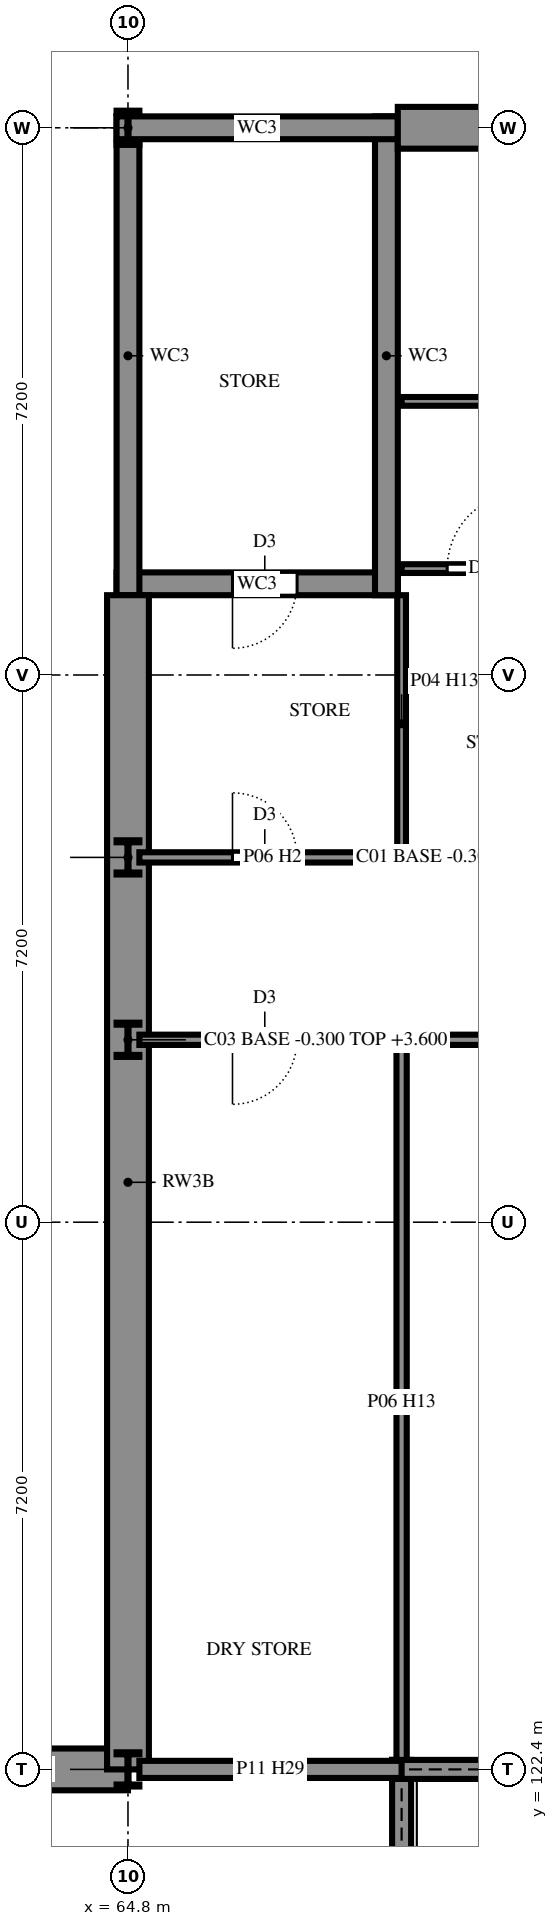
"""IFC4 building model, lengths in metres.
Left out: names, types, materials, properties, quantities, classifications, styles, units other than length and angle.
Written with IfcOpenShell. Run it as: python <this file> out.ifc"""

import sys

from ifc_helpers import new_model, si_unit, direction, frame, frame_2d, origin, origin_2d, place, context, subcontext, project, spatial, rectangle, i_section, extrude, element, fill, save


model = new_model("IFC4")
c1 = context("Model", 3, precision=1e-05, world=origin(), true_north=direction((0.0, 1.0)))
c2 = subcontext(c1, "Body", "Model", "MODEL_VIEW")
j1 = project(units=[si_unit("LENGTHUNIT", "METRE"), si_unit("PLANEANGLEUNIT", "RADIAN")], contexts=[c1])
p1 = place(None, origin())
s1 = spatial("IfcSite", under=j1, at=p1, CompositionType="ELEMENT")
p2 = place(p1, origin())
s2 = spatial("IfcBuilding", under=s1, at=p2, CompositionType="ELEMENT")
p3 = place(p2, origin())
s3 = spatial("IfcBuildingStorey", under=s2, at=p3, CompositionType="ELEMENT", Elevation=0.0)
for number, where, z_axis, x_axis in (
    (1, (64.8, 122.4, -0.3), (0.0, 0.0, 1.0), (1.0, 0.0, 0.0)),
    (2, (64.8, 132.0, -0.3), (0.0, 0.0, 1.0), (1.0, 0.0, 0.0)),
    (3, (64.8, 134.4, -0.3), (0.0, 0.0, 1.0), (1.0, 0.0, 0.0)),
    (4, (64.8, 144.0, -0.3), (0.0, 0.0, 1.0), (1.0, 0.0, 0.0)),
):
    element("IfcColumn", number, at=place(p3, frame(where, z_axis=z_axis, x_axis=x_axis)), inside=s3, PredefinedType="COLUMN", context=c2, shape_type="SweptSolid", body=[
        extrude(i_section(OverallWidth=0.3, OverallDepth=0.45, WebThickness=0.014, FlangeThickness=0.026, FilletRadius=0.027, at=origin_2d()), origin(), (0.0, 0.0, 1.0), 3.9),
    ])
p4 = place(p3, frame((68.4, 122.525, 0.0), z_axis=(0.0, 0.0, 1.0), x_axis=(0.0, -1.0, 0.0)))
e5 = element("IfcWall", 5, at=p4, inside=s3, PredefinedType="SHEAR", context=c2, shape_type="SweptSolid", body=[
    extrude(rectangle(XDim=6.75, YDim=0.25, at=frame_2d((3.375, 0.0))), origin(), (0.0, 0.0, 1.0), 3.6),
])
p5 = place(p3, frame((73.525, 122.4, 0.0), z_axis=(0.0, 0.0, 1.0), x_axis=(-1.0, 0.0, 0.0)))
e6 = element("IfcWall", 6, at=p5, inside=s3, PredefinedType="SHEAR", context=c2, shape_type="SweptSolid", body=[
    extrude(rectangle(XDim=5.25, YDim=0.25, at=frame_2d((2.625, 0.0))), origin(), (0.0, 0.0, 1.0), 3.6),
])
p6 = place(p3, frame((64.65, 138.0, 0.0), z_axis=(0.0, 0.0, 1.0), x_axis=(1.0, 0.0, 0.0)))
e7 = element("IfcWall", 7, at=p6, inside=s3, PredefinedType="SHEAR", context=c2, shape_type="SweptSolid", body=[
    extrude(rectangle(XDim=3.7, YDim=0.3, at=frame_2d((1.85, 0.0))), origin(), (0.0, 0.0, 1.0), 3.6),
])
p7 = place(p6, frame((1.525, 0.0, 0.0)))
e8 = element("IfcOpeningElement", 8, at=p7, cuts=e7, PredefinedType="OPENING", context=c2, shape_type="SweptSolid", body=[
    extrude(rectangle(XDim=0.85, YDim=2.1, at=frame_2d((0.425, 1.05))), frame((0.0, 0.16, 0.0), z_axis=(0.0, -1.0, 0.0), x_axis=(1.0, 0.0, 0.0)), (0.0, 0.0, 1.0), 0.32),
])
for number, where, z_axis, x_axis in (
    (9, (68.2, 137.85, 0.0), (0.0, 0.0, 1.0), (0.0, 1.0, 0.0)),
    (10, (64.8, 144.15, 0.0), (0.0, 0.0, 1.0), (0.0, -1.0, 0.0)),
):
    element("IfcWall", number, at=place(p3, frame(where, z_axis=z_axis, x_axis=x_axis)), inside=s3, PredefinedType="SHEAR", context=c2, shape_type="SweptSolid", body=[
        extrude(rectangle(XDim=6.3, YDim=0.3, at=frame_2d((3.15, 0.0))), origin(), (0.0, 0.0, 1.0), 3.6),
    ])
p8 = place(p3, frame((68.35, 144.0, 0.0), z_axis=(0.0, 0.0, 1.0), x_axis=(-1.0, 0.0, 0.0)))
e11 = element("IfcWall", 11, at=p8, inside=s3, PredefinedType="SHEAR", context=c2, shape_type="SweptSolid", body=[
    extrude(rectangle(XDim=3.7, YDim=0.3, at=frame_2d((1.85, 0.0))), origin(), (0.0, 0.0, 1.0), 3.6),
])
p9 = place(p3, frame((17.325, 122.4, 0.0), z_axis=(0.0, 0.0, 1.0), x_axis=(1.0, 0.0, 0.0)))
e12 = element("IfcWall", 12, at=p9, inside=s3, PredefinedType="SOLIDWALL", context=c2, shape_type="SweptSolid", body=[
    extrude(rectangle(XDim=47.475, YDim=0.55, at=frame_2d((23.738, 0.0))), origin(), (0.0, 0.0, 1.0), 3.6),
])
p10 = place(p3, frame((68.35, 144.0, 0.0), z_axis=(0.0, 0.0, 1.0), x_axis=(1.0, 0.0, 0.0)))
e13 = element("IfcWall", 13, at=p10, inside=s3, PredefinedType="SOLIDWALL", context=c2, shape_type="SweptSolid", body=[
    extrude(rectangle(XDim=25.05, YDim=0.55, at=frame_2d((12.525, 0.0))), origin(), (0.0, 0.0, 1.0), 3.6),
])
p11 = place(p3, frame((64.8, 122.4, 0.0), z_axis=(0.0, 0.0, 1.0), x_axis=(0.0, 1.0, 0.0)))
e14 = element("IfcWall", 14, at=p11, inside=s3, PredefinedType="SOLIDWALL", context=c2, shape_type="SweptSolid", body=[
    extrude(rectangle(XDim=15.45, YDim=0.55, at=frame_2d((7.725, 0.0))), origin(), (0.0, 0.0, 1.0), 3.6),
])
p12 = place(p3, frame((64.95, 122.4, 0.0), z_axis=(0.0, 0.0, 1.0), x_axis=(1.0, 0.0, 0.0)))
e15 = element("IfcWall", 15, at=p12, inside=s3, PredefinedType="PARTITIONING", context=c2, shape_type="SweptSolid", body=[
    extrude(rectangle(XDim=3.45, YDim=0.225, at=frame_2d((1.725, 0.0))), origin(), (0.0, 0.0, 1.0), 3.21),
])
p13 = place(p3, frame((64.95, 132.0, 0.0), z_axis=(0.0, 0.0, 1.0), x_axis=(1.0, 0.0, 0.0)))
e16 = element("IfcWall", 16, at=p13, inside=s3, PredefinedType="PARTITIONING", context=c2, shape_type="SweptSolid", body=[
    extrude(rectangle(XDim=14.318, YDim=0.135, at=frame_2d((7.159, 0.0))), origin(), (0.0, 0.0, 1.0), 3.12),
])
p14 = place(p13, frame((1.225, 0.0, 0.0)))
e17 = element("IfcOpeningElement", 17, at=p14, cuts=e16, PredefinedType="OPENING", context=c2, shape_type="SweptSolid", body=[
    extrude(rectangle(XDim=0.85, YDim=2.1, at=frame_2d((0.425, 1.05))), frame((0.0, 0.077, 0.0), z_axis=(0.0, -1.0, 0.0), x_axis=(1.0, 0.0, 0.0)), (0.0, 0.0, 1.0), 0.155),
])
p15 = place(p3, frame((64.95, 134.4, 0.0), z_axis=(0.0, 0.0, 1.0), x_axis=(1.0, 0.0, 0.0)))
e18 = element("IfcWall", 18, at=p15, inside=s3, PredefinedType="PARTITIONING", context=c2, shape_type="SweptSolid", body=[
    extrude(rectangle(XDim=3.508, YDim=0.135, at=frame_2d((1.754, 0.0))), origin(), (0.0, 0.0, 1.0), 3.12),
])
p16 = place(p15, frame((1.225, 0.0, 0.0)))
e19 = element("IfcOpeningElement", 19, at=p16, cuts=e18, PredefinedType="OPENING", context=c2, shape_type="SweptSolid", body=[
    extrude(rectangle(XDim=0.85, YDim=2.1, at=frame_2d((0.425, 1.05))), frame((0.0, 0.077, 0.0), z_axis=(0.0, -1.0, 0.0), x_axis=(1.0, 0.0, 0.0)), (0.0, 0.0, 1.0), 0.155),
])
p17 = place(p3, frame((68.343, 134.4, 0.0), z_axis=(0.0, 0.0, 1.0), x_axis=(1.0, 0.0, 0.0)))
e20 = element("IfcWall", 20, at=p17, inside=s3, PredefinedType="PARTITIONING", context=c2, shape_type="SweptSolid", body=[
    extrude(rectangle(XDim=7.315, YDim=0.115, at=frame_2d((3.657, 0.0))), origin(), (0.0, 0.0, 1.0), 3.12),
])
p18 = place(p17, frame((5.357, 0.0, 0.0)))
e21 = element("IfcOpeningElement", 21, at=p18, cuts=e20, PredefinedType="OPENING", context=c2, shape_type="SweptSolid", body=[
    extrude(rectangle(XDim=1.0, YDim=2.1, at=frame_2d((0.5, 1.05))), frame((0.0, 0.067, 0.0), z_axis=(0.0, -1.0, 0.0), x_axis=(1.0, 0.0, 0.0)), (0.0, 0.0, 1.0), 0.135),
])
p19 = place(p3, frame((68.4, 138.2, 0.0), z_axis=(0.0, 0.0, 1.0), x_axis=(1.0, 0.0, 0.0)))
e22 = element("IfcWall", 22, at=p19, inside=s3, PredefinedType="PARTITIONING", context=c2, shape_type="SweptSolid", body=[
    extrude(rectangle(XDim=5.858, YDim=0.115, at=frame_2d((2.929, 0.0))), origin(), (0.0, 0.0, 1.0), 3.42),
])
p20 = place(p19, frame((0.6, 0.0, 0.0)))
e23 = element("IfcOpeningElement", 23, at=p20, cuts=e22, PredefinedType="OPENING", context=c2, shape_type="SweptSolid", body=[
    extrude(rectangle(XDim=1.0, YDim=2.1, at=frame_2d((0.5, 1.05))), frame((0.0, 0.067, 0.0), z_axis=(0.0, -1.0, 0.0), x_axis=(1.0, 0.0, 0.0)), (0.0, 0.0, 1.0), 0.135),
])
p21 = place(p19, frame((2.4, 0.0, 0.0)))
e24 = element("IfcOpeningElement", 24, at=p21, cuts=e22, PredefinedType="OPENING", context=c2, shape_type="SweptSolid", body=[
    extrude(rectangle(XDim=0.8, YDim=2.1, at=frame_2d((0.4, 1.05))), frame((0.0, 0.067, 0.0), z_axis=(0.0, -1.0, 0.0), x_axis=(1.0, 0.0, 0.0)), (0.0, 0.0, 1.0), 0.135),
])
p22 = place(p19, frame((3.6, 0.0, 0.0)))
e25 = element("IfcOpeningElement", 25, at=p22, cuts=e22, PredefinedType="OPENING", context=c2, shape_type="SweptSolid", body=[
    extrude(rectangle(XDim=0.8, YDim=2.1, at=frame_2d((0.4, 1.05))), frame((0.0, 0.067, 0.0), z_axis=(0.0, -1.0, 0.0), x_axis=(1.0, 0.0, 0.0)), (0.0, 0.0, 1.0), 0.135),
])
p23 = place(p19, frame((4.8, 0.0, 0.0)))
e26 = element("IfcOpeningElement", 26, at=p23, cuts=e22, PredefinedType="OPENING", context=c2, shape_type="SweptSolid", body=[
    extrude(rectangle(XDim=0.8, YDim=2.1, at=frame_2d((0.4, 1.05))), frame((0.0, 0.067, 0.0), z_axis=(0.0, -1.0, 0.0), x_axis=(1.0, 0.0, 0.0)), (0.0, 0.0, 1.0), 0.135),
])
p24 = place(p3, frame((68.4, 140.4, 0.0), z_axis=(0.0, 0.0, 1.0), x_axis=(1.0, 0.0, 0.0)))
e27 = element("IfcWall", 27, at=p24, inside=s3, PredefinedType="PARTITIONING", context=c2, shape_type="SweptSolid", body=[
    extrude(rectangle(XDim=7.258, YDim=0.115, at=frame_2d((3.629, 0.0))), origin(), (0.0, 0.0, 1.0), 3.42),
])
p25 = place(p3, frame((68.4, 122.525, 0.0), z_axis=(0.0, 0.0, 1.0), x_axis=(0.0, 1.0, 0.0)))
e28 = element("IfcWall", 28, at=p25, inside=s3, PredefinedType="PARTITIONING", context=c2, shape_type="SweptSolid", body=[
    extrude(rectangle(XDim=9.408, YDim=0.135, at=frame_2d((4.704, 0.0))), origin(), (0.0, 0.0, 1.0), 3.02),
])
p26 = place(p3, frame((68.4, 134.468, 0.0), z_axis=(0.0, 0.0, 1.0), x_axis=(0.0, 1.0, 0.0)))
e29 = element("IfcWall", 29, at=p26, inside=s3, PredefinedType="PARTITIONING", context=c2, shape_type="SweptSolid", body=[
    extrude(rectangle(XDim=3.383, YDim=0.115, at=frame_2d((1.691, 0.0))), origin(), (0.0, 0.0, 1.0), 3.02),
])
p27 = place(p14, frame((0.85, 0.0, 0.0), z_axis=(0.0, 0.0, 1.0), x_axis=(-1.0, 0.0, 0.0)))
e30 = element("IfcDoor", 30, at=p27, inside=s3, OperationType="SINGLE_SWING_LEFT", PredefinedType="DOOR", context=c2, shape_type="SweptSolid", body=[
    extrude(rectangle(XDim=0.85, YDim=2.1, at=frame_2d((0.425, 1.05))), frame((0.0, 0.025, 0.0), z_axis=(0.0, -1.0, 0.0), x_axis=(1.0, 0.0, 0.0)), (0.0, 0.0, 1.0), 0.05),
])
fill(e17, e30)
p28 = place(p16, origin())
e31 = element("IfcDoor", 31, at=p28, inside=s3, OperationType="SINGLE_SWING_RIGHT", PredefinedType="DOOR", context=c2, shape_type="SweptSolid", body=[
    extrude(rectangle(XDim=0.85, YDim=2.1, at=frame_2d((0.425, 1.05))), frame((0.0, 0.025, 0.0), z_axis=(0.0, -1.0, 0.0), x_axis=(1.0, 0.0, 0.0)), (0.0, 0.0, 1.0), 0.05),
])
fill(e19, e31)
p29 = place(p20, origin())
e32 = element("IfcDoor", 32, at=p29, inside=s3, OperationType="SINGLE_SWING_LEFT", PredefinedType="DOOR", context=c2, shape_type="SweptSolid", body=[
    extrude(rectangle(XDim=1.0, YDim=2.1, at=frame_2d((0.5, 1.05))), frame((0.0, 0.025, 0.0), z_axis=(0.0, -1.0, 0.0), x_axis=(1.0, 0.0, 0.0)), (0.0, 0.0, 1.0), 0.05),
])
fill(e23, e32)
p30 = place(p7, frame((0.85, 0.0, 0.0), z_axis=(0.0, 0.0, 1.0), x_axis=(-1.0, 0.0, 0.0)))
e33 = element("IfcDoor", 33, at=p30, inside=s3, OperationType="SINGLE_SWING_LEFT", PredefinedType="DOOR", context=c2, shape_type="SweptSolid", body=[
    extrude(rectangle(XDim=0.85, YDim=2.1, at=frame_2d((0.425, 1.05))), frame((0.0, 0.025, 0.0), z_axis=(0.0, -1.0, 0.0), x_axis=(1.0, 0.0, 0.0)), (0.0, 0.0, 1.0), 0.05),
])
fill(e8, e33)
save(model, sys.argv[1])
